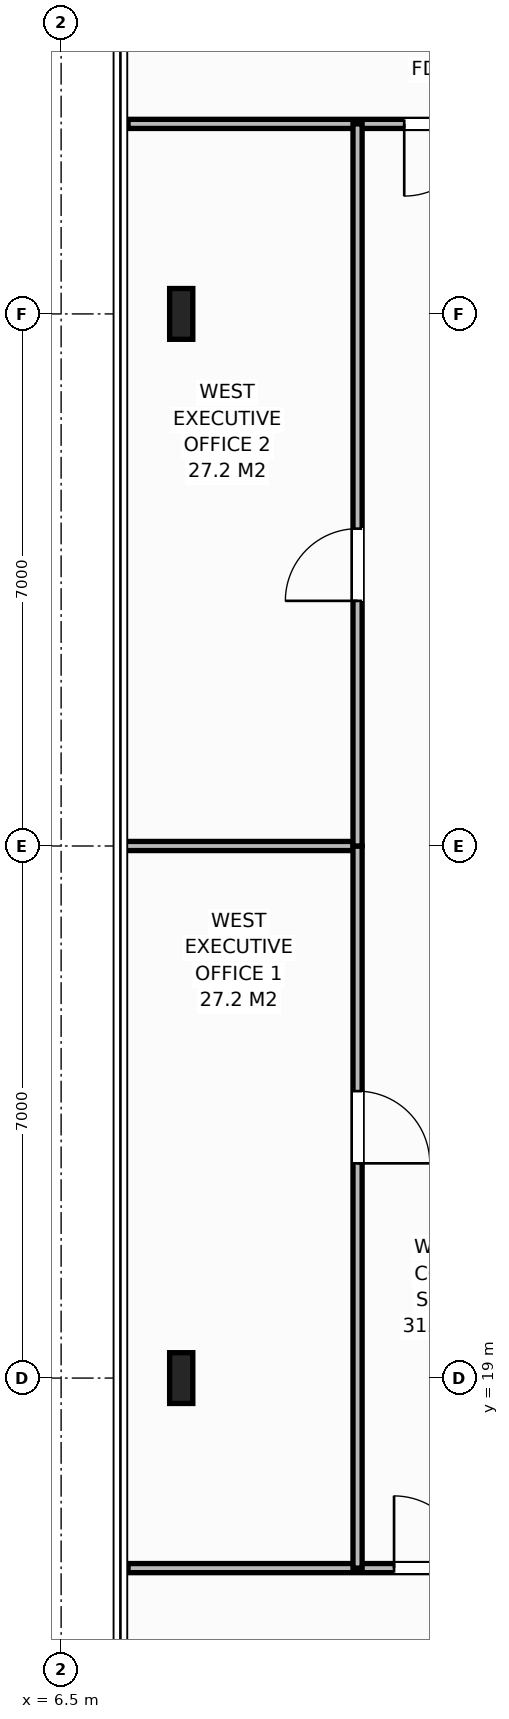
"""IFC4 building model, lengths in metres.
Left out: names, types, materials, properties, quantities, classifications, styles, units other than length and angle.
Written with IfcOpenShell. Run it as: python <this file> out.ifc"""

import sys

from ifc_helpers import new_model, si_unit, direction, frame, frame_2d, origin, origin_2d, place, context, subcontext, project, spatial, rectangle, i_section, extrude, element, fill, save


model = new_model("IFC4")
c1 = context("Model", 3, precision=1e-05, world=origin(), true_north=direction((0.0, 1.0)))
c2 = subcontext(c1, "Body", "Model", "MODEL_VIEW")
j1 = project(units=[si_unit("LENGTHUNIT", "METRE"), si_unit("PLANEANGLEUNIT", "RADIAN")], contexts=[c1])
p1 = place(None, origin())
s1 = spatial("IfcSite", under=j1, at=p1, CompositionType="ELEMENT")
p2 = place(p1, origin())
s2 = spatial("IfcBuilding", under=s1, at=p2, CompositionType="ELEMENT")
p3 = place(p2, frame((0.0, 0.0, 278.4)))
s3 = spatial("IfcBuildingStorey", under=s2, at=p3, CompositionType="ELEMENT", Elevation=278.4)
for number, where, z_axis, x_axis in (
    (1, (8.08, 19.0, 0.0), (0.0, 0.0, 1.0), (1.0, 0.0, 0.0)),
    (2, (8.08, 33.0, 0.0), (0.0, 0.0, 1.0), (1.0, 0.0, 0.0)),
):
    element("IfcColumn", number, at=place(p3, frame(where, z_axis=z_axis, x_axis=x_axis)), inside=s3, PredefinedType="COLUMN", context=c2, shape_type="SweptSolid", body=[
        extrude(i_section(OverallWidth=0.305, OverallDepth=0.668, WebThickness=0.021, FlangeThickness=0.04, at=origin_2d()), origin(), (0.0, 0.0, 1.0), 4.0),
    ])
p4 = place(p3, frame((7.38, 35.5, 0.0), z_axis=(0.0, 0.0, 1.0), x_axis=(1.0, 0.0, 0.0)))
e3 = element("IfcWall", 3, at=p4, inside=s3, PredefinedType="PARTITIONING", context=c2, shape_type="SweptSolid", body=[
    extrude(rectangle(XDim=5.198, YDim=0.12, at=frame_2d((2.599, 0.0))), origin(), (0.0, 0.0, 1.0), 3.788),
])
p5 = place(p4, frame((3.634, 0.0, 0.0)))
e4 = element("IfcOpeningElement", 4, at=p5, cuts=e3, PredefinedType="OPENING", context=c2, shape_type="SweptSolid", body=[
    extrude(rectangle(XDim=0.95, YDim=2.15, at=frame_2d((0.475, 1.075))), frame((0.0, 0.07, 0.0), z_axis=(0.0, -1.0, 0.0), x_axis=(1.0, 0.0, 0.0)), (0.0, 0.0, 1.0), 0.14),
])
p6 = place(p3, frame((7.38, 16.5, 0.0), z_axis=(0.0, 0.0, 1.0), x_axis=(1.0, 0.0, 0.0)))
e5 = element("IfcWall", 5, at=p6, inside=s3, PredefinedType="PARTITIONING", context=c2, shape_type="SweptSolid", body=[
    extrude(rectangle(XDim=7.49, YDim=0.12, at=frame_2d((3.745, 0.0))), origin(), (0.0, 0.0, 1.0), 3.788),
])
p7 = place(p6, frame((3.5, 0.0, 0.0)))
e6 = element("IfcOpeningElement", 6, at=p7, cuts=e5, PredefinedType="OPENING", context=c2, shape_type="SweptSolid", body=[
    extrude(rectangle(XDim=0.95, YDim=2.15, at=frame_2d((0.475, 1.075))), frame((0.0, 0.07, 0.0), z_axis=(0.0, -1.0, 0.0), x_axis=(1.0, 0.0, 0.0)), (0.0, 0.0, 1.0), 0.14),
])
p8 = place(p3, frame((7.22, 26.0, 0.0), z_axis=(0.0, 0.0, 1.0), x_axis=(1.0, 0.0, 0.0)))
e7 = element("IfcWall", 7, at=p8, inside=s3, PredefinedType="PARTITIONING", context=c2, shape_type="SweptSolid", body=[
    extrude(rectangle(XDim=3.18, YDim=0.12, at=frame_2d((1.59, 0.0))), origin(), (0.0, 0.0, 1.0), 3.788),
])
p9 = place(p3, frame((10.4, 16.5, 0.0), z_axis=(0.0, 0.0, 1.0), x_axis=(0.0, 1.0, 0.0)))
e8 = element("IfcWall", 8, at=p9, inside=s3, PredefinedType="PARTITIONING", context=c2, shape_type="SweptSolid", body=[
    extrude(rectangle(XDim=9.5, YDim=0.12, at=frame_2d((4.75, 0.0))), origin(), (0.0, 0.0, 1.0), 3.788),
])
p10 = place(p9, frame((5.325, 0.0, 0.0)))
e9 = element("IfcOpeningElement", 9, at=p10, cuts=e8, PredefinedType="OPENING", context=c2, shape_type="SweptSolid", body=[
    extrude(rectangle(XDim=0.95, YDim=2.15, at=frame_2d((0.475, 1.075))), frame((0.0, 0.07, 0.0), z_axis=(0.0, -1.0, 0.0), x_axis=(1.0, 0.0, 0.0)), (0.0, 0.0, 1.0), 0.14),
])
p11 = place(p3, frame((10.4, 26.0, 0.0), z_axis=(0.0, 0.0, 1.0), x_axis=(0.0, 1.0, 0.0)))
e10 = element("IfcWall", 10, at=p11, inside=s3, PredefinedType="PARTITIONING", context=c2, shape_type="SweptSolid", body=[
    extrude(rectangle(XDim=9.5, YDim=0.12, at=frame_2d((4.75, 0.0))), origin(), (0.0, 0.0, 1.0), 3.788),
])
p12 = place(p11, frame((3.225, 0.0, 0.0)))
e11 = element("IfcOpeningElement", 11, at=p12, cuts=e10, PredefinedType="OPENING", context=c2, shape_type="SweptSolid", body=[
    extrude(rectangle(XDim=0.95, YDim=2.15, at=frame_2d((0.475, 1.075))), frame((0.0, 0.07, 0.0), z_axis=(0.0, -1.0, 0.0), x_axis=(1.0, 0.0, 0.0)), (0.0, 0.0, 1.0), 0.14),
])
p13 = place(p5, origin())
e12 = element("IfcDoor", 12, at=p13, inside=s3, OperationType="SINGLE_SWING_RIGHT", PredefinedType="DOOR", context=c2, shape_type="SweptSolid", body=[
    extrude(rectangle(XDim=0.95, YDim=2.15, at=frame_2d((0.475, 1.075))), frame((0.0, 0.025, 0.0), z_axis=(0.0, -1.0, 0.0), x_axis=(1.0, 0.0, 0.0)), (0.0, 0.0, 1.0), 0.05),
])
fill(e4, e12)
p14 = place(p7, origin())
e13 = element("IfcDoor", 13, at=p14, inside=s3, OperationType="SINGLE_SWING_LEFT", PredefinedType="DOOR", context=c2, shape_type="SweptSolid", body=[
    extrude(rectangle(XDim=0.95, YDim=2.15, at=frame_2d((0.475, 1.075))), frame((0.0, 0.025, 0.0), z_axis=(0.0, -1.0, 0.0), x_axis=(1.0, 0.0, 0.0)), (0.0, 0.0, 1.0), 0.05),
])
fill(e6, e13)
p15 = place(p10, origin())
e14 = element("IfcDoor", 14, at=p15, inside=s3, OperationType="SINGLE_SWING_RIGHT", PredefinedType="DOOR", context=c2, shape_type="SweptSolid", body=[
    extrude(rectangle(XDim=0.95, YDim=2.15, at=frame_2d((0.475, 1.075))), frame((0.0, 0.025, 0.0), z_axis=(0.0, -1.0, 0.0), x_axis=(1.0, 0.0, 0.0)), (0.0, 0.0, 1.0), 0.05),
])
fill(e9, e14)
p16 = place(p12, origin())
e15 = element("IfcDoor", 15, at=p16, inside=s3, OperationType="SINGLE_SWING_LEFT", PredefinedType="DOOR", context=c2, shape_type="SweptSolid", body=[
    extrude(rectangle(XDim=0.95, YDim=2.15, at=frame_2d((0.475, 1.075))), frame((0.0, 0.025, 0.0), z_axis=(0.0, -1.0, 0.0), x_axis=(1.0, 0.0, 0.0)), (0.0, 0.0, 1.0), 0.05),
])
fill(e11, e15)
save(model, sys.argv[1])
